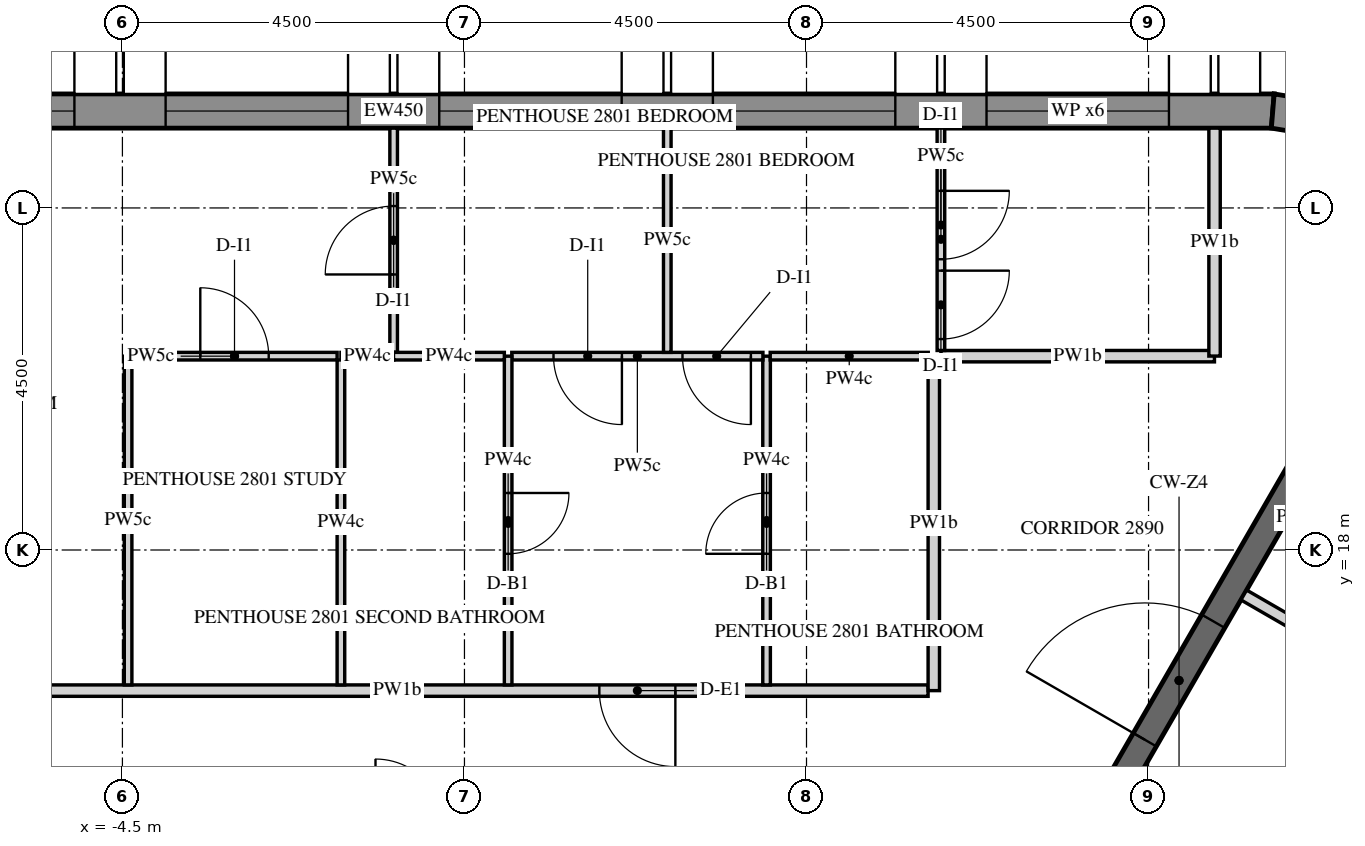
"""IFC4 building model, lengths in metres.
Left out: names, types, materials, properties, quantities, classifications, styles, units other than length and angle.
Written with IfcOpenShell. Run it as: python <this file> out.ifc"""

import sys

from ifc_helpers import new_model, si_unit, direction, frame, frame_2d, origin, place, context, subcontext, project, spatial, polyline, rectangle, outline, extrude, element, fill, save


model = new_model("IFC4")
c1 = context("Model", 3, precision=1e-05, world=origin(), true_north=direction((0.0, 1.0)))
c2 = subcontext(c1, "Body", "Model", "MODEL_VIEW")
j1 = project(units=[si_unit("LENGTHUNIT", "METRE"), si_unit("PLANEANGLEUNIT", "RADIAN")], contexts=[c1])
p1 = place(None, origin())
s1 = spatial("IfcSite", under=j1, at=p1, CompositionType="ELEMENT")
p2 = place(p1, origin())
s2 = spatial("IfcBuilding", under=s1, at=p2, CompositionType="ELEMENT")
p3 = place(p2, frame((0.0, 0.0, 361.2)))
s3 = spatial("IfcBuildingStorey", under=s2, at=p3, CompositionType="ELEMENT", Elevation=361.2)
p4 = place(p3, frame((10.634, 23.775, -0.15), z_axis=(0.0, 0.0, 1.0), x_axis=(-1.0, 0.0, 0.0)))
e1 = element("IfcWall", 1, at=p4, inside=s3, PredefinedType="SOLIDWALL", context=c2, shape_type="SweptSolid", body=[
    extrude(outline(polyline([(-0.018, -0.225), (23.153, -0.225), (23.111, 0.225), (0.018, 0.225), (-0.018, -0.225)])), origin(), (0.0, 0.0, 1.0), 3.9),
])
p5 = place(p4, frame((1.366, 0.0, 0.45)))
e2 = element("IfcOpeningElement", 2, at=p5, cuts=e1, PredefinedType="OPENING", context=c2, shape_type="SweptSolid", body=[
    extrude(rectangle(XDim=2.4, YDim=3.0, at=frame_2d((1.2, 1.5))), frame((0.0, 0.235, 0.0), z_axis=(0.0, -1.0, 0.0), x_axis=(1.0, 0.0, 0.0)), (0.0, 0.0, 1.0), 0.47),
])
p6 = place(p4, frame((4.966, 0.0, 0.45)))
e3 = element("IfcOpeningElement", 3, at=p6, cuts=e1, PredefinedType="OPENING", context=c2, shape_type="SweptSolid", body=[
    extrude(rectangle(XDim=2.4, YDim=3.0, at=frame_2d((1.2, 1.5))), frame((0.0, 0.235, 0.0), z_axis=(0.0, -1.0, 0.0), x_axis=(1.0, 0.0, 0.0)), (0.0, 0.0, 1.0), 0.47),
])
p7 = place(p4, frame((8.566, 0.0, 0.45)))
e4 = element("IfcOpeningElement", 4, at=p7, cuts=e1, PredefinedType="OPENING", context=c2, shape_type="SweptSolid", body=[
    extrude(rectangle(XDim=2.4, YDim=3.0, at=frame_2d((1.2, 1.5))), frame((0.0, 0.235, 0.0), z_axis=(0.0, -1.0, 0.0), x_axis=(1.0, 0.0, 0.0)), (0.0, 0.0, 1.0), 0.47),
])
p8 = place(p4, frame((12.166, 0.0, 0.45)))
e5 = element("IfcOpeningElement", 5, at=p8, cuts=e1, PredefinedType="OPENING", context=c2, shape_type="SweptSolid", body=[
    extrude(rectangle(XDim=2.4, YDim=3.0, at=frame_2d((1.2, 1.5))), frame((0.0, 0.235, 0.0), z_axis=(0.0, -1.0, 0.0), x_axis=(1.0, 0.0, 0.0)), (0.0, 0.0, 1.0), 0.47),
])
p9 = place(p4, frame((15.766, 0.0, 0.45)))
e6 = element("IfcOpeningElement", 6, at=p9, cuts=e1, PredefinedType="OPENING", context=c2, shape_type="SweptSolid", body=[
    extrude(rectangle(XDim=2.4, YDim=3.0, at=frame_2d((1.2, 1.5))), frame((0.0, 0.235, 0.0), z_axis=(0.0, -1.0, 0.0), x_axis=(1.0, 0.0, 0.0)), (0.0, 0.0, 1.0), 0.47),
])
p10 = place(p4, frame((19.366, 0.0, 0.45)))
e7 = element("IfcOpeningElement", 7, at=p10, cuts=e1, PredefinedType="OPENING", context=c2, shape_type="SweptSolid", body=[
    extrude(rectangle(XDim=2.4, YDim=3.0, at=frame_2d((1.2, 1.5))), frame((0.0, 0.235, 0.0), z_axis=(0.0, -1.0, 0.0), x_axis=(1.0, 0.0, 0.0)), (0.0, 0.0, 1.0), 0.47),
])
p11 = place(p3, frame((11.843, 23.576, -0.15), z_axis=(0.0, 0.0, 1.0), x_axis=(-0.986773862881, 0.162102879475, 0.0)))
e8 = element("IfcWall", 8, at=p11, inside=s3, PredefinedType="SOLIDWALL", context=c2, shape_type="SweptSolid", body=[
    extrude(outline(polyline([(-0.037, -0.225), (1.243, -0.225), (1.206, 0.225), (0.037, 0.225), (-0.037, -0.225)])), origin(), (0.0, 0.0, 1.0), 3.9),
])
p12 = place(p3, frame((5.773, 10.0, -0.15), z_axis=(0.0, 0.0, 1.0), x_axis=(0.500007911273, 0.866020836161, 0.0)))
e9 = element("IfcWall", 9, at=p12, inside=s3, PredefinedType="SHEAR", context=c2, shape_type="SweptSolid", body=[
    extrude(rectangle(XDim=14.51, YDim=0.35, at=frame_2d((7.255, 0.0))), origin(), (0.0, 0.0, 1.0), 3.9),
])
p13 = place(p12, frame((6.355, 0.0, 0.15)))
e10 = element("IfcOpeningElement", 10, at=p13, cuts=e9, PredefinedType="OPENING", context=c2, shape_type="SweptSolid", body=[
    extrude(rectangle(XDim=1.8, YDim=2.4, at=frame_2d((0.9, 1.2))), frame((0.0, 0.185, 0.0), z_axis=(0.0, -1.0, 0.0), x_axis=(1.0, 0.0, 0.0)), (0.0, 0.0, 1.0), 0.37),
])
p14 = place(p3, frame((6.1, 16.15, 0.0), z_axis=(0.0, 0.0, 1.0), x_axis=(-1.0, 0.0, 0.0)))
e11 = element("IfcWall", 11, at=p14, inside=s3, PredefinedType="PARTITIONING", context=c2, shape_type="SweptSolid", body=[
    extrude(rectangle(XDim=13.966, YDim=0.15, at=frame_2d((6.983, 0.0))), origin(), (0.0, 0.0, 1.0), 2.82),
])
p15 = place(p14, frame((3.325, 0.0, 0.0)))
e12 = element("IfcOpeningElement", 12, at=p15, cuts=e11, PredefinedType="OPENING", context=c2, shape_type="SweptSolid", body=[
    extrude(rectangle(XDim=1.0, YDim=2.1, at=frame_2d((0.5, 1.05))), frame((0.0, 0.085, 0.0), z_axis=(0.0, -1.0, 0.0), x_axis=(1.0, 0.0, 0.0)), (0.0, 0.0, 1.0), 0.17),
])
p16 = place(p3, frame((6.175, 20.55, 0.0), z_axis=(0.0, 0.0, 1.0), x_axis=(0.0, -1.0, 0.0)))
e13 = element("IfcWall", 13, at=p16, inside=s3, PredefinedType="PARTITIONING", context=c2, shape_type="SweptSolid", body=[
    extrude(rectangle(XDim=4.4, YDim=0.15, at=frame_2d((2.2, 0.0))), origin(), (0.0, 0.0, 1.0), 2.82),
])
p17 = place(p3, frame((9.867, 20.55, 0.0), z_axis=(0.0, 0.0, 1.0), x_axis=(-1.0, 0.0, 0.0)))
e14 = element("IfcWall", 14, at=p17, inside=s3, PredefinedType="PARTITIONING", context=c2, shape_type="SweptSolid", body=[
    extrude(rectangle(XDim=3.599, YDim=0.15, at=frame_2d((1.799, 0.0))), origin(), (0.0, 0.0, 1.0), 2.82),
])
p18 = place(p3, frame((9.868, 23.55, 0.0), z_axis=(0.0, 0.0, 1.0), x_axis=(0.0, -1.0, 0.0)))
e15 = element("IfcWall", 15, at=p18, inside=s3, PredefinedType="PARTITIONING", context=c2, shape_type="SweptSolid", body=[
    extrude(rectangle(XDim=2.999, YDim=0.15, at=frame_2d((1.5, 0.0))), origin(), (0.0, 0.0, 1.0), 2.82),
])
p19 = place(p3, frame((9.142, 11.885, 0.0), z_axis=(0.0, 0.0, 1.0), x_axis=(0.500004822225, 0.866022619654, 0.0)))
e16 = element("IfcWall", 16, at=p19, inside=s3, PredefinedType="PARTITIONING", context=c2, shape_type="SweptSolid", body=[
    extrude(rectangle(XDim=5.339, YDim=0.15, at=frame_2d((2.669, 0.0))), origin(), (0.0, 0.0, 1.0), 2.82),
])
p20 = place(p3, frame((11.747, 16.546, 0.0), z_axis=(0.0, 0.0, 1.0), x_axis=(-0.866013532718, 0.500020560727, 0.0)))
e17 = element("IfcWall", 17, at=p20, inside=s3, PredefinedType="PARTITIONING", context=c2, shape_type="SweptSolid", body=[
    extrude(rectangle(XDim=1.725, YDim=0.15, at=frame_2d((0.863, 0.0))), origin(), (0.0, 0.0, 1.0), 2.82),
])
p21 = place(p3, frame((-0.932, 20.6, 0.0), z_axis=(0.0, 0.0, 1.0), x_axis=(0.0, 1.0, 0.0)))
e18 = element("IfcWall", 18, at=p21, inside=s3, PredefinedType="PARTITIONING", context=c2, shape_type="SweptSolid", body=[
    extrude(rectangle(XDim=2.95, YDim=0.1, at=frame_2d((1.475, 0.0))), origin(), (0.0, 0.0, 1.0), 2.82),
])
p22 = place(p21, frame((1.025, 0.0, 0.0)))
e19 = element("IfcOpeningElement", 19, at=p22, cuts=e18, PredefinedType="OPENING", context=c2, shape_type="SweptSolid", body=[
    extrude(rectangle(XDim=0.9, YDim=2.1, at=frame_2d((0.45, 1.05))), frame((0.0, 0.06, 0.0), z_axis=(0.0, -1.0, 0.0), x_axis=(1.0, 0.0, 0.0)), (0.0, 0.0, 1.0), 0.12),
])
p23 = place(p3, frame((-1.625, 20.55, 0.0), z_axis=(0.0, 0.0, 1.0), x_axis=(1.0, 0.0, 0.0)))
e20 = element("IfcWall", 20, at=p23, inside=s3, PredefinedType="PARTITIONING", context=c2, shape_type="SweptSolid", body=[
    extrude(rectangle(XDim=0.696, YDim=0.1, at=frame_2d((0.348, 0.0))), origin(), (0.0, 0.0, 1.0), 2.82),
])
p24 = place(p3, frame((-4.425, 16.225, 0.0), z_axis=(0.0, 0.0, 1.0), x_axis=(0.0, 1.0, 0.0)))
e21 = element("IfcWall", 21, at=p24, inside=s3, PredefinedType="PARTITIONING", context=c2, shape_type="SweptSolid", body=[
    extrude(rectangle(XDim=4.325, YDim=0.1, at=frame_2d((2.163, 0.0))), origin(), (0.0, 0.0, 1.0), 2.82),
])
p25 = place(p3, frame((-4.375, 20.55, 0.0), z_axis=(0.0, 0.0, 1.0), x_axis=(1.0, 0.0, 0.0)))
e22 = element("IfcWall", 22, at=p25, inside=s3, PredefinedType="PARTITIONING", context=c2, shape_type="SweptSolid", body=[
    extrude(rectangle(XDim=2.7, YDim=0.1, at=frame_2d((1.35, 0.0))), origin(), (0.0, 0.0, 1.0), 2.82),
])
p26 = place(p25, frame((0.9, 0.0, 0.0)))
e23 = element("IfcOpeningElement", 23, at=p26, cuts=e22, PredefinedType="OPENING", context=c2, shape_type="SweptSolid", body=[
    extrude(rectangle(XDim=0.9, YDim=2.1, at=frame_2d((0.45, 1.05))), frame((0.0, 0.06, 0.0), z_axis=(0.0, -1.0, 0.0), x_axis=(1.0, 0.0, 0.0)), (0.0, 0.0, 1.0), 0.12),
])
p27 = place(p3, frame((3.975, 16.225, 0.0), z_axis=(0.0, 0.0, 1.0), x_axis=(0.0, 1.0, 0.0)))
e24 = element("IfcWall", 24, at=p27, inside=s3, PredefinedType="PARTITIONING", context=c2, shape_type="SweptSolid", body=[
    extrude(rectangle(XDim=4.325, YDim=0.1, at=frame_2d((2.163, 0.0))), origin(), (0.0, 0.0, 1.0), 2.82),
])
p28 = place(p27, frame((1.725, 0.0, 0.0)))
e25 = element("IfcOpeningElement", 25, at=p28, cuts=e24, PredefinedType="OPENING", context=c2, shape_type="SweptSolid", body=[
    extrude(rectangle(XDim=0.8, YDim=2.1, at=frame_2d((0.4, 1.05))), frame((0.0, 0.06, 0.0), z_axis=(0.0, -1.0, 0.0), x_axis=(1.0, 0.0, 0.0)), (0.0, 0.0, 1.0), 0.12),
])
p29 = place(p3, frame((3.927, 20.55, 0.0), z_axis=(0.0, 0.0, 1.0), x_axis=(-1.0, 0.0, 0.0)))
e26 = element("IfcWall", 26, at=p29, inside=s3, PredefinedType="PARTITIONING", context=c2, shape_type="SweptSolid", body=[
    extrude(rectangle(XDim=3.304, YDim=0.1, at=frame_2d((1.652, 0.0))), origin(), (0.0, 0.0, 1.0), 2.82),
])
p30 = place(p29, frame((0.158, 0.0, 0.0)))
e27 = element("IfcOpeningElement", 27, at=p30, cuts=e26, PredefinedType="OPENING", context=c2, shape_type="SweptSolid", body=[
    extrude(rectangle(XDim=0.9, YDim=2.1, at=frame_2d((0.45, 1.05))), frame((0.0, 0.06, 0.0), z_axis=(0.0, -1.0, 0.0), x_axis=(1.0, 0.0, 0.0)), (0.0, 0.0, 1.0), 0.12),
])
p31 = place(p29, frame((1.855, 0.0, 0.0)))
e28 = element("IfcOpeningElement", 28, at=p31, cuts=e26, PredefinedType="OPENING", context=c2, shape_type="SweptSolid", body=[
    extrude(rectangle(XDim=0.9, YDim=2.1, at=frame_2d((0.45, 1.05))), frame((0.0, 0.06, 0.0), z_axis=(0.0, -1.0, 0.0), x_axis=(1.0, 0.0, 0.0)), (0.0, 0.0, 1.0), 0.12),
])
p32 = place(p3, frame((0.575, 20.55, 0.0), z_axis=(0.0, 0.0, 1.0), x_axis=(0.0, -1.0, 0.0)))
e29 = element("IfcWall", 29, at=p32, inside=s3, PredefinedType="PARTITIONING", context=c2, shape_type="SweptSolid", body=[
    extrude(rectangle(XDim=4.325, YDim=0.1, at=frame_2d((2.163, 0.0))), origin(), (0.0, 0.0, 1.0), 2.82),
])
p33 = place(p32, frame((1.8, 0.0, 0.0)))
e30 = element("IfcOpeningElement", 30, at=p33, cuts=e29, PredefinedType="OPENING", context=c2, shape_type="SweptSolid", body=[
    extrude(rectangle(XDim=0.8, YDim=2.1, at=frame_2d((0.4, 1.05))), frame((0.0, 0.06, 0.0), z_axis=(0.0, -1.0, 0.0), x_axis=(1.0, 0.0, 0.0)), (0.0, 0.0, 1.0), 0.12),
])
p34 = place(p3, frame((6.102, 20.55, 0.0), z_axis=(0.0, 0.0, 1.0), x_axis=(-1.0, 0.0, 0.0)))
e31 = element("IfcWall", 31, at=p34, inside=s3, PredefinedType="PARTITIONING", context=c2, shape_type="SweptSolid", body=[
    extrude(rectangle(XDim=2.079, YDim=0.1, at=frame_2d((1.04, 0.0))), origin(), (0.0, 0.0, 1.0), 2.82),
])
p35 = place(p3, frame((6.268, 23.55, 0.0), z_axis=(0.0, 0.0, 1.0), x_axis=(0.0, -1.0, 0.0)))
e32 = element("IfcWall", 32, at=p35, inside=s3, PredefinedType="PARTITIONING", context=c2, shape_type="SweptSolid", body=[
    extrude(rectangle(XDim=2.925, YDim=0.1, at=frame_2d((1.462, 0.0))), origin(), (0.0, 0.0, 1.0), 2.82),
])
p36 = place(p35, frame((1.875, 0.0, 0.0)))
e33 = element("IfcOpeningElement", 33, at=p36, cuts=e32, PredefinedType="OPENING", context=c2, shape_type="SweptSolid", body=[
    extrude(rectangle(XDim=0.9, YDim=2.1, at=frame_2d((0.45, 1.05))), frame((0.0, 0.06, 0.0), z_axis=(0.0, -1.0, 0.0), x_axis=(1.0, 0.0, 0.0)), (0.0, 0.0, 1.0), 0.12),
])
p37 = place(p35, frame((0.825, 0.0, 0.0)))
e34 = element("IfcOpeningElement", 34, at=p37, cuts=e32, PredefinedType="OPENING", context=c2, shape_type="SweptSolid", body=[
    extrude(rectangle(XDim=0.9, YDim=2.1, at=frame_2d((0.45, 1.05))), frame((0.0, 0.06, 0.0), z_axis=(0.0, -1.0, 0.0), x_axis=(1.0, 0.0, 0.0)), (0.0, 0.0, 1.0), 0.12),
])
p38 = place(p3, frame((2.668, 23.55, 0.0), z_axis=(0.0, 0.0, 1.0), x_axis=(0.0, -1.0, 0.0)))
e35 = element("IfcWall", 35, at=p38, inside=s3, PredefinedType="PARTITIONING", context=c2, shape_type="SweptSolid", body=[
    extrude(rectangle(XDim=2.95, YDim=0.1, at=frame_2d((1.475, 0.0))), origin(), (0.0, 0.0, 1.0), 2.82),
])
p39 = place(p3, frame((-0.934, 20.55, 0.0), z_axis=(0.0, 0.0, 1.0), x_axis=(1.0, 0.0, 0.0)))
e36 = element("IfcWall", 36, at=p39, inside=s3, PredefinedType="PARTITIONING", context=c2, shape_type="SweptSolid", body=[
    extrude(rectangle(XDim=1.458, YDim=0.1, at=frame_2d((0.729, 0.0))), origin(), (0.0, 0.0, 1.0), 2.82),
])
p40 = place(p3, frame((-1.625, 20.5, 0.0), z_axis=(0.0, 0.0, 1.0), x_axis=(0.0, -1.0, 0.0)))
e37 = element("IfcWall", 37, at=p40, inside=s3, PredefinedType="PARTITIONING", context=c2, shape_type="SweptSolid", body=[
    extrude(rectangle(XDim=4.275, YDim=0.1, at=frame_2d((2.137, 0.0))), origin(), (0.0, 0.0, 1.0), 2.82),
])
p41 = place(p5, frame((0.0, 0.155, 0.0)))
e38 = element("IfcWindow", 38, at=p41, inside=s3, PartitioningType="DOUBLE_PANEL_VERTICAL", PredefinedType="WINDOW", context=c2, shape_type="SweptSolid", body=[
    extrude(rectangle(XDim=2.4, YDim=3.0, at=frame_2d((1.2, 1.5))), frame((0.0, 0.03, 0.0), z_axis=(0.0, -1.0, 0.0), x_axis=(1.0, 0.0, 0.0)), (0.0, 0.0, 1.0), 0.06),
])
fill(e2, e38)
p42 = place(p6, frame((0.0, 0.155, 0.0)))
e39 = element("IfcWindow", 39, at=p42, inside=s3, PartitioningType="DOUBLE_PANEL_VERTICAL", PredefinedType="WINDOW", context=c2, shape_type="SweptSolid", body=[
    extrude(rectangle(XDim=2.4, YDim=3.0, at=frame_2d((1.2, 1.5))), frame((0.0, 0.03, 0.0), z_axis=(0.0, -1.0, 0.0), x_axis=(1.0, 0.0, 0.0)), (0.0, 0.0, 1.0), 0.06),
])
fill(e3, e39)
p43 = place(p7, frame((0.0, 0.155, 0.0)))
e40 = element("IfcWindow", 40, at=p43, inside=s3, PartitioningType="DOUBLE_PANEL_VERTICAL", PredefinedType="WINDOW", context=c2, shape_type="SweptSolid", body=[
    extrude(rectangle(XDim=2.4, YDim=3.0, at=frame_2d((1.2, 1.5))), frame((0.0, 0.03, 0.0), z_axis=(0.0, -1.0, 0.0), x_axis=(1.0, 0.0, 0.0)), (0.0, 0.0, 1.0), 0.06),
])
fill(e4, e40)
p44 = place(p8, frame((0.0, 0.155, 0.0)))
e41 = element("IfcWindow", 41, at=p44, inside=s3, PartitioningType="DOUBLE_PANEL_VERTICAL", PredefinedType="WINDOW", context=c2, shape_type="SweptSolid", body=[
    extrude(rectangle(XDim=2.4, YDim=3.0, at=frame_2d((1.2, 1.5))), frame((0.0, 0.03, 0.0), z_axis=(0.0, -1.0, 0.0), x_axis=(1.0, 0.0, 0.0)), (0.0, 0.0, 1.0), 0.06),
])
fill(e5, e41)
p45 = place(p9, frame((0.0, 0.155, 0.0)))
e42 = element("IfcWindow", 42, at=p45, inside=s3, PartitioningType="DOUBLE_PANEL_VERTICAL", PredefinedType="WINDOW", context=c2, shape_type="SweptSolid", body=[
    extrude(rectangle(XDim=2.4, YDim=3.0, at=frame_2d((1.2, 1.5))), frame((0.0, 0.03, 0.0), z_axis=(0.0, -1.0, 0.0), x_axis=(1.0, 0.0, 0.0)), (0.0, 0.0, 1.0), 0.06),
])
fill(e6, e42)
p46 = place(p13, origin())
e43 = element("IfcDoor", 43, at=p46, inside=s3, OperationType="DOUBLE_DOOR_SINGLE_SWING", PredefinedType="DOOR", context=c2, shape_type="SweptSolid", body=[
    extrude(rectangle(XDim=1.8, YDim=2.4, at=frame_2d((0.9, 1.2))), frame((0.0, 0.025, 0.0), z_axis=(0.0, -1.0, 0.0), x_axis=(1.0, 0.0, 0.0)), (0.0, 0.0, 1.0), 0.05),
])
fill(e10, e43)
p47 = place(p15, origin())
e44 = element("IfcDoor", 44, at=p47, inside=s3, OperationType="SINGLE_SWING_RIGHT", PredefinedType="DOOR", context=c2, shape_type="SweptSolid", body=[
    extrude(rectangle(XDim=1.0, YDim=2.1, at=frame_2d((0.5, 1.05))), frame((0.0, 0.025, 0.0), z_axis=(0.0, -1.0, 0.0), x_axis=(1.0, 0.0, 0.0)), (0.0, 0.0, 1.0), 0.05),
])
fill(e12, e44)
p48 = place(p28, origin())
e45 = element("IfcDoor", 45, at=p48, inside=s3, OperationType="SINGLE_SWING_RIGHT", PredefinedType="DOOR", context=c2, shape_type="SweptSolid", body=[
    extrude(rectangle(XDim=0.8, YDim=2.1, at=frame_2d((0.4, 1.05))), frame((0.0, 0.025, 0.0), z_axis=(0.0, -1.0, 0.0), x_axis=(1.0, 0.0, 0.0)), (0.0, 0.0, 1.0), 0.05),
])
fill(e25, e45)
p49 = place(p30, origin())
e46 = element("IfcDoor", 46, at=p49, inside=s3, OperationType="SINGLE_SWING_LEFT", PredefinedType="DOOR", context=c2, shape_type="SweptSolid", body=[
    extrude(rectangle(XDim=0.9, YDim=2.1, at=frame_2d((0.45, 1.05))), frame((0.0, 0.025, 0.0), z_axis=(0.0, -1.0, 0.0), x_axis=(1.0, 0.0, 0.0)), (0.0, 0.0, 1.0), 0.05),
])
fill(e27, e46)
p50 = place(p36, origin())
e47 = element("IfcDoor", 47, at=p50, inside=s3, OperationType="SINGLE_SWING_RIGHT", PredefinedType="DOOR", context=c2, shape_type="SweptSolid", body=[
    extrude(rectangle(XDim=0.9, YDim=2.1, at=frame_2d((0.45, 1.05))), frame((0.0, 0.025, 0.0), z_axis=(0.0, -1.0, 0.0), x_axis=(1.0, 0.0, 0.0)), (0.0, 0.0, 1.0), 0.05),
])
fill(e33, e47)
p51 = place(p37, origin())
e48 = element("IfcDoor", 48, at=p51, inside=s3, OperationType="SINGLE_SWING_RIGHT", PredefinedType="DOOR", context=c2, shape_type="SweptSolid", body=[
    extrude(rectangle(XDim=0.9, YDim=2.1, at=frame_2d((0.45, 1.05))), frame((0.0, 0.025, 0.0), z_axis=(0.0, -1.0, 0.0), x_axis=(1.0, 0.0, 0.0)), (0.0, 0.0, 1.0), 0.05),
])
fill(e34, e48)
p52 = place(p31, origin())
e49 = element("IfcDoor", 49, at=p52, inside=s3, OperationType="SINGLE_SWING_LEFT", PredefinedType="DOOR", context=c2, shape_type="SweptSolid", body=[
    extrude(rectangle(XDim=0.9, YDim=2.1, at=frame_2d((0.45, 1.05))), frame((0.0, 0.025, 0.0), z_axis=(0.0, -1.0, 0.0), x_axis=(1.0, 0.0, 0.0)), (0.0, 0.0, 1.0), 0.05),
])
fill(e28, e49)
p53 = place(p33, origin())
e50 = element("IfcDoor", 50, at=p53, inside=s3, OperationType="SINGLE_SWING_LEFT", PredefinedType="DOOR", context=c2, shape_type="SweptSolid", body=[
    extrude(rectangle(XDim=0.8, YDim=2.1, at=frame_2d((0.4, 1.05))), frame((0.0, 0.025, 0.0), z_axis=(0.0, -1.0, 0.0), x_axis=(1.0, 0.0, 0.0)), (0.0, 0.0, 1.0), 0.05),
])
fill(e30, e50)
p54 = place(p26, origin())
e51 = element("IfcDoor", 51, at=p54, inside=s3, OperationType="SINGLE_SWING_LEFT", PredefinedType="DOOR", context=c2, shape_type="SweptSolid", body=[
    extrude(rectangle(XDim=0.9, YDim=2.1, at=frame_2d((0.45, 1.05))), frame((0.0, 0.025, 0.0), z_axis=(0.0, -1.0, 0.0), x_axis=(1.0, 0.0, 0.0)), (0.0, 0.0, 1.0), 0.05),
])
fill(e23, e51)
p55 = place(p22, origin())
e52 = element("IfcDoor", 52, at=p55, inside=s3, OperationType="SINGLE_SWING_RIGHT", PredefinedType="DOOR", context=c2, shape_type="SweptSolid", body=[
    extrude(rectangle(XDim=0.9, YDim=2.1, at=frame_2d((0.45, 1.05))), frame((0.0, 0.025, 0.0), z_axis=(0.0, -1.0, 0.0), x_axis=(1.0, 0.0, 0.0)), (0.0, 0.0, 1.0), 0.05),
])
fill(e19, e52)
save(model, sys.argv[1])
